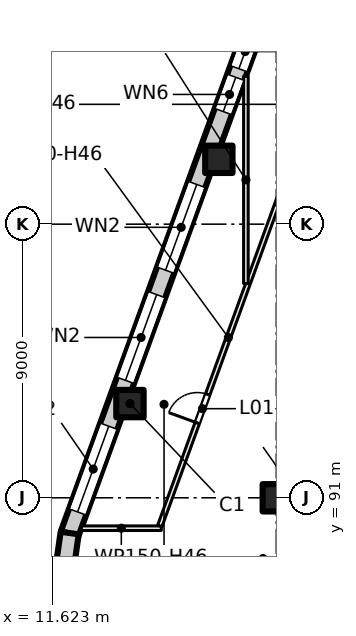
"""IFC4 building model, lengths in metres.
Left out: names, types, materials, properties, quantities, classifications, styles, units other than length and angle.
Written with IfcOpenShell. Run it as: python <this file> out.ifc"""

import sys

from ifc_helpers import new_model, si_unit, direction, frame, frame_2d, origin, origin_2d, place, context, subcontext, project, spatial, rectangle, extrude, element, fill, save


model = new_model("IFC4")
c1 = context("Model", 3, precision=1e-05, world=origin(), true_north=direction((0.0, 1.0)))
c2 = subcontext(c1, "Body", "Model", "MODEL_VIEW")
j1 = project(units=[si_unit("LENGTHUNIT", "METRE"), si_unit("PLANEANGLEUNIT", "RADIAN")], contexts=[c1])
p1 = place(None, origin())
s1 = spatial("IfcSite", under=j1, at=p1, CompositionType="ELEMENT")
p2 = place(p1, origin())
s2 = spatial("IfcBuilding", under=s1, at=p2, CompositionType="ELEMENT")
p3 = place(p2, frame((0.0, 0.0, 7.5)))
s3 = spatial("IfcBuildingStorey", under=s2, at=p3, CompositionType="ELEMENT", Elevation=7.5)
for number, where, z_axis, x_axis in (
    (1, (19.0, 91.0, 0.0), (0.0, 0.0, 1.0), (1.0, 0.0, 0.0)),
    (2, (14.187, 94.099, 0.0), (0.0, 0.0, 1.0), (1.0, 0.0, 0.0)),
    (3, (17.111, 102.133, 0.0), (0.0, 0.0, 1.0), (1.0, 0.0, 0.0)),
):
    element("IfcColumn", number, at=place(p3, frame(where, z_axis=z_axis, x_axis=x_axis)), inside=s3, PredefinedType="COLUMN", context=c2, shape_type="SweptSolid", body=[
        extrude(rectangle(XDim=0.9, YDim=0.9, at=origin_2d()), origin(), (0.0, 0.0, 1.0), 5.0),
    ])
p4 = place(p3, frame((19.05, 85.239, 0.0), z_axis=(0.0, 0.0, 1.0), x_axis=(0.342016982193, 0.939693771338, 0.0)))
e4 = element("IfcWall", 4, at=p4, inside=s3, PredefinedType="SHEAR", context=c2, shape_type="SweptSolid", body=[
    extrude(rectangle(XDim=7.8, YDim=0.6, at=frame_2d((3.9, 0.0))), origin(), (0.0, 0.0, 1.0), 5.0),
])
p5 = place(p3, frame((12.199, 89.809, 0.0), z_axis=(0.0, 0.0, 1.0), x_axis=(0.342022998908, 0.939691581434, 0.0)))
e5 = element("IfcWall", 5, at=p5, inside=s3, PredefinedType="SOLIDWALL", context=c2, shape_type="SweptSolid", body=[
    extrude(rectangle(XDim=47.334, YDim=0.6, at=frame_2d((23.667, 0.0))), origin(), (0.0, 0.0, 1.0), 4.6),
])
p6 = place(p5, frame((0.773, 0.0, 0.9)))
e6 = element("IfcOpeningElement", 6, at=p6, cuts=e5, PredefinedType="OPENING", context=c2, shape_type="SweptSolid", body=[
    extrude(rectangle(XDim=3.0, YDim=3.0, at=frame_2d((1.5, 1.5))), frame((0.0, 0.31, 0.0), z_axis=(0.0, -1.0, 0.0), x_axis=(1.0, 0.0, 0.0)), (0.0, 0.0, 1.0), 0.62),
])
p7 = place(p5, frame((5.379, 0.0, 0.9)))
e7 = element("IfcOpeningElement", 7, at=p7, cuts=e5, PredefinedType="OPENING", context=c2, shape_type="SweptSolid", body=[
    extrude(rectangle(XDim=3.0, YDim=3.0, at=frame_2d((1.5, 1.5))), frame((0.0, 0.31, 0.0), z_axis=(0.0, -1.0, 0.0), x_axis=(1.0, 0.0, 0.0)), (0.0, 0.0, 1.0), 0.62),
])
p8 = place(p5, frame((9.235, 0.0, 0.9)))
e8 = element("IfcOpeningElement", 8, at=p8, cuts=e5, PredefinedType="OPENING", context=c2, shape_type="SweptSolid", body=[
    extrude(rectangle(XDim=3.0, YDim=3.0, at=frame_2d((1.5, 1.5))), frame((0.0, 0.31, 0.0), z_axis=(0.0, -1.0, 0.0), x_axis=(1.0, 0.0, 0.0)), (0.0, 0.0, 1.0), 0.62),
])
p9 = place(p5, frame((14.786, 0.0, 0.9)))
e9 = element("IfcOpeningElement", 9, at=p9, cuts=e5, PredefinedType="OPENING", context=c2, shape_type="SweptSolid", body=[
    extrude(rectangle(XDim=1.2, YDim=3.0, at=frame_2d((0.6, 1.5))), frame((0.0, 0.31, 0.0), z_axis=(0.0, -1.0, 0.0), x_axis=(1.0, 0.0, 0.0)), (0.0, 0.0, 1.0), 0.62),
])
p10 = place(p5, frame((16.286, 0.0, 0.9)))
e10 = element("IfcOpeningElement", 10, at=p10, cuts=e5, PredefinedType="OPENING", context=c2, shape_type="SweptSolid", body=[
    extrude(rectangle(XDim=1.2, YDim=3.0, at=frame_2d((0.6, 1.5))), frame((0.0, 0.31, 0.0), z_axis=(0.0, -1.0, 0.0), x_axis=(1.0, 0.0, 0.0)), (0.0, 0.0, 1.0), 0.62),
])
p11 = place(p5, frame((18.118, 0.0, 0.9)))
e11 = element("IfcOpeningElement", 11, at=p11, cuts=e5, PredefinedType="OPENING", context=c2, shape_type="SweptSolid", body=[
    extrude(rectangle(XDim=1.2, YDim=3.0, at=frame_2d((0.6, 1.5))), frame((0.0, 0.31, 0.0), z_axis=(0.0, -1.0, 0.0), x_axis=(1.0, 0.0, 0.0)), (0.0, 0.0, 1.0), 0.62),
])
p12 = place(p5, frame((19.618, 0.0, 0.9)))
e12 = element("IfcOpeningElement", 12, at=p12, cuts=e5, PredefinedType="OPENING", context=c2, shape_type="SweptSolid", body=[
    extrude(rectangle(XDim=1.2, YDim=3.0, at=frame_2d((0.6, 1.5))), frame((0.0, 0.31, 0.0), z_axis=(0.0, -1.0, 0.0), x_axis=(1.0, 0.0, 0.0)), (0.0, 0.0, 1.0), 0.62),
])
p13 = place(p5, frame((22.452, 0.0, 0.9)))
e13 = element("IfcOpeningElement", 13, at=p13, cuts=e5, PredefinedType="OPENING", context=c2, shape_type="SweptSolid", body=[
    extrude(rectangle(XDim=3.0, YDim=3.0, at=frame_2d((1.5, 1.5))), frame((0.0, 0.31, 0.0), z_axis=(0.0, -1.0, 0.0), x_axis=(1.0, 0.0, 0.0)), (0.0, 0.0, 1.0), 0.62),
])
p14 = place(p5, frame((26.458, 0.0, 0.9)))
e14 = element("IfcOpeningElement", 14, at=p14, cuts=e5, PredefinedType="OPENING", context=c2, shape_type="SweptSolid", body=[
    extrude(rectangle(XDim=3.0, YDim=3.0, at=frame_2d((1.5, 1.5))), frame((0.0, 0.31, 0.0), z_axis=(0.0, -1.0, 0.0), x_axis=(1.0, 0.0, 0.0)), (0.0, 0.0, 1.0), 0.62),
])
p15 = place(p5, frame((31.064, 0.0, 0.9)))
e15 = element("IfcOpeningElement", 15, at=p15, cuts=e5, PredefinedType="OPENING", context=c2, shape_type="SweptSolid", body=[
    extrude(rectangle(XDim=3.0, YDim=3.0, at=frame_2d((1.5, 1.5))), frame((0.0, 0.31, 0.0), z_axis=(0.0, -1.0, 0.0), x_axis=(1.0, 0.0, 0.0)), (0.0, 0.0, 1.0), 0.62),
])
p16 = place(p5, frame((36.029, 0.0, 0.9)))
e16 = element("IfcOpeningElement", 16, at=p16, cuts=e5, PredefinedType="OPENING", context=c2, shape_type="SweptSolid", body=[
    extrude(rectangle(XDim=1.2, YDim=3.0, at=frame_2d((0.6, 1.5))), frame((0.0, 0.31, 0.0), z_axis=(0.0, -1.0, 0.0), x_axis=(1.0, 0.0, 0.0)), (0.0, 0.0, 1.0), 0.62),
])
p17 = place(p5, frame((39.676, 0.0, 0.9)))
e17 = element("IfcOpeningElement", 17, at=p17, cuts=e5, PredefinedType="OPENING", context=c2, shape_type="SweptSolid", body=[
    extrude(rectangle(XDim=3.0, YDim=3.0, at=frame_2d((1.5, 1.5))), frame((0.0, 0.31, 0.0), z_axis=(0.0, -1.0, 0.0), x_axis=(1.0, 0.0, 0.0)), (0.0, 0.0, 1.0), 0.62),
])
p18 = place(p5, frame((43.531, 0.0, 0.9)))
e18 = element("IfcOpeningElement", 18, at=p18, cuts=e5, PredefinedType="OPENING", context=c2, shape_type="SweptSolid", body=[
    extrude(rectangle(XDim=3.0, YDim=3.0, at=frame_2d((1.5, 1.5))), frame((0.0, 0.31, 0.0), z_axis=(0.0, -1.0, 0.0), x_axis=(1.0, 0.0, 0.0)), (0.0, 0.0, 1.0), 0.62),
])
p19 = place(p3, frame((11.641, 85.92, 0.0), z_axis=(0.0, 0.0, 1.0), x_axis=(0.142240980655, 0.989832058191, 0.0)))
e19 = element("IfcWall", 19, at=p19, inside=s3, PredefinedType="SOLIDWALL", context=c2, shape_type="SweptSolid", body=[
    extrude(rectangle(XDim=3.961, YDim=0.6, at=frame_2d((1.981, 0.0))), origin(), (0.0, 0.0, 1.0), 4.6),
])
p20 = place(p3, frame((12.588, 90.0, 0.0), z_axis=(0.0, 0.0, 1.0), x_axis=(1.0, 0.0, 0.0)))
e20 = element("IfcWall", 20, at=p20, inside=s3, PredefinedType="PARTITIONING", context=c2, shape_type="SweptSolid", body=[
    extrude(rectangle(XDim=2.629, YDim=0.15, at=frame_2d((1.314, 0.0))), origin(), (0.0, 0.0, 1.0), 4.6),
])
p21 = place(p3, frame((15.169, 90.075, 0.0), z_axis=(0.0, 0.0, 1.0), x_axis=(0.342068648332, 0.93967496499, 0.0)))
e21 = element("IfcWall", 21, at=p21, inside=s3, PredefinedType="PARTITIONING", context=c2, shape_type="SweptSolid", body=[
    extrude(rectangle(XDim=13.185, YDim=0.15, at=frame_2d((6.592, 0.0))), origin(), (0.0, 0.0, 1.0), 4.6),
])
p22 = place(p21, frame((3.604, 0.0, 0.0)))
e22 = element("IfcOpeningElement", 22, at=p22, cuts=e21, PredefinedType="OPENING", context=c2, shape_type="SweptSolid", body=[
    extrude(rectangle(XDim=1.0, YDim=2.1, at=frame_2d((0.5, 1.05))), frame((0.0, 0.085, 0.0), z_axis=(0.0, -1.0, 0.0), x_axis=(1.0, 0.0, 0.0)), (0.0, 0.0, 1.0), 0.17),
])
p23 = place(p21, frame((11.227, 0.0, 0.0)))
e23 = element("IfcOpeningElement", 23, at=p23, cuts=e21, PredefinedType="OPENING", context=c2, shape_type="SweptSolid", body=[
    extrude(rectangle(XDim=1.0, YDim=2.1, at=frame_2d((0.5, 1.05))), frame((0.0, 0.085, 0.0), z_axis=(0.0, -1.0, 0.0), x_axis=(1.0, 0.0, 0.0)), (0.0, 0.0, 1.0), 0.17),
])
p24 = place(p3, frame((18.0, 98.046, 0.0), z_axis=(0.0, 0.0, 1.0), x_axis=(0.0, 1.0, 0.0)))
e24 = element("IfcWall", 24, at=p24, inside=s3, PredefinedType="PARTITIONING", context=c2, shape_type="SweptSolid", body=[
    extrude(rectangle(XDim=6.823, YDim=0.15, at=frame_2d((3.412, 0.0))), origin(), (0.0, 0.0, 1.0), 4.6),
])
p25 = place(p6, origin())
e25 = element("IfcWindow", 25, at=p25, inside=s3, PartitioningType="SINGLE_PANEL", PredefinedType="WINDOW", context=c2, shape_type="SweptSolid", body=[
    extrude(rectangle(XDim=3.0, YDim=3.0, at=frame_2d((1.5, 1.5))), frame((0.0, 0.03, 0.0), z_axis=(0.0, -1.0, 0.0), x_axis=(1.0, 0.0, 0.0)), (0.0, 0.0, 1.0), 0.06),
])
fill(e6, e25)
p26 = place(p7, origin())
e26 = element("IfcWindow", 26, at=p26, inside=s3, PartitioningType="SINGLE_PANEL", PredefinedType="WINDOW", context=c2, shape_type="SweptSolid", body=[
    extrude(rectangle(XDim=3.0, YDim=3.0, at=frame_2d((1.5, 1.5))), frame((0.0, 0.03, 0.0), z_axis=(0.0, -1.0, 0.0), x_axis=(1.0, 0.0, 0.0)), (0.0, 0.0, 1.0), 0.06),
])
fill(e7, e26)
p27 = place(p8, origin())
e27 = element("IfcWindow", 27, at=p27, inside=s3, PartitioningType="SINGLE_PANEL", PredefinedType="WINDOW", context=c2, shape_type="SweptSolid", body=[
    extrude(rectangle(XDim=3.0, YDim=3.0, at=frame_2d((1.5, 1.5))), frame((0.0, 0.03, 0.0), z_axis=(0.0, -1.0, 0.0), x_axis=(1.0, 0.0, 0.0)), (0.0, 0.0, 1.0), 0.06),
])
fill(e8, e27)
p28 = place(p9, origin())
e28 = element("IfcWindow", 28, at=p28, inside=s3, PartitioningType="SINGLE_PANEL", PredefinedType="WINDOW", context=c2, shape_type="SweptSolid", body=[
    extrude(rectangle(XDim=1.2, YDim=3.0, at=frame_2d((0.6, 1.5))), frame((0.0, 0.03, 0.0), z_axis=(0.0, -1.0, 0.0), x_axis=(1.0, 0.0, 0.0)), (0.0, 0.0, 1.0), 0.06),
])
fill(e9, e28)
p29 = place(p10, origin())
e29 = element("IfcWindow", 29, at=p29, inside=s3, PartitioningType="SINGLE_PANEL", PredefinedType="WINDOW", context=c2, shape_type="SweptSolid", body=[
    extrude(rectangle(XDim=1.2, YDim=3.0, at=frame_2d((0.6, 1.5))), frame((0.0, 0.03, 0.0), z_axis=(0.0, -1.0, 0.0), x_axis=(1.0, 0.0, 0.0)), (0.0, 0.0, 1.0), 0.06),
])
fill(e10, e29)
p30 = place(p22, origin())
e30 = element("IfcDoor", 30, at=p30, inside=s3, OperationType="SINGLE_SWING_LEFT", PredefinedType="DOOR", context=c2, shape_type="SweptSolid", body=[
    extrude(rectangle(XDim=1.0, YDim=2.1, at=frame_2d((0.5, 1.05))), frame((0.0, 0.025, 0.0), z_axis=(0.0, -1.0, 0.0), x_axis=(1.0, 0.0, 0.0)), (0.0, 0.0, 1.0), 0.05),
])
fill(e22, e30)
p31 = place(p23, origin())
e31 = element("IfcDoor", 31, at=p31, inside=s3, OperationType="SINGLE_SWING_RIGHT", PredefinedType="DOOR", context=c2, shape_type="SweptSolid", body=[
    extrude(rectangle(XDim=1.0, YDim=2.1, at=frame_2d((0.5, 1.05))), frame((0.0, 0.025, 0.0), z_axis=(0.0, -1.0, 0.0), x_axis=(1.0, 0.0, 0.0)), (0.0, 0.0, 1.0), 0.05),
])
fill(e23, e31)
save(model, sys.argv[1])
